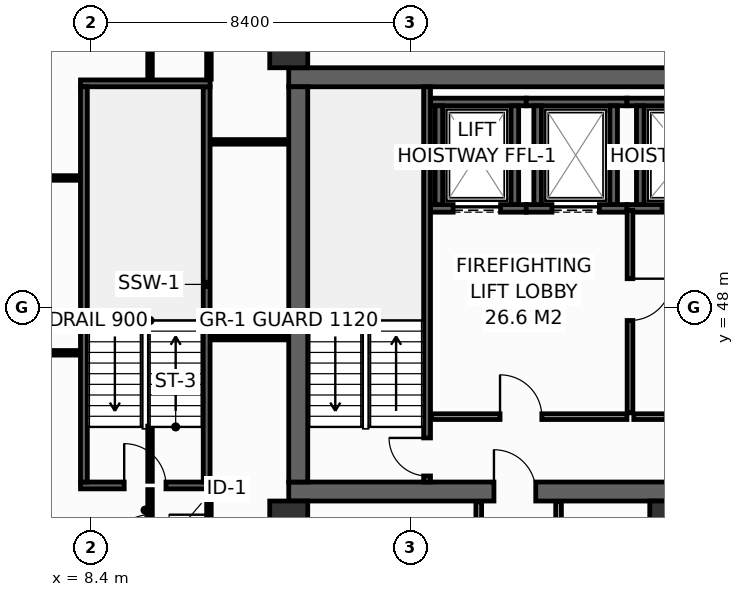
"""IFC4 building model, lengths in metres.
Left out: names, types, materials, properties, quantities, classifications, styles, units other than length and angle.
Written with IfcOpenShell. Run it as: python <this file> out.ifc"""

import sys

from ifc_helpers import new_model, si_unit, direction, frame, frame_2d, origin, origin_2d, place, context, subcontext, project, spatial, rectangle, hollow_rectangle, extrude, element, fill, save


model = new_model("IFC4")
c1 = context("Model", 3, precision=1e-05, world=origin(), true_north=direction((0.0, 1.0)))
c2 = subcontext(c1, "Body", "Model", "MODEL_VIEW")
j1 = project(units=[si_unit("LENGTHUNIT", "METRE"), si_unit("PLANEANGLEUNIT", "RADIAN")], contexts=[c1])
p1 = place(None, origin())
s1 = spatial("IfcSite", under=j1, at=p1, CompositionType="ELEMENT")
p2 = place(p1, origin())
s2 = spatial("IfcBuilding", under=s1, at=p2, CompositionType="ELEMENT")
p3 = place(p2, frame((0.0, 0.0, 133.4)))
s3 = spatial("IfcBuildingStorey", under=s2, at=p3, CompositionType="ELEMENT", Elevation=133.4)
p4 = place(p3, frame((13.6, 43.15, 0.0), z_axis=(0.0, 0.0, 1.0), x_axis=(1.0, 0.0, 0.0)))
e1 = element("IfcWall", 1, at=p4, inside=s3, PredefinedType="SHEAR", context=c2, shape_type="SweptSolid", body=[
    extrude(rectangle(XDim=32.7, YDim=0.5, at=frame_2d((16.35, 0.0))), origin(), (0.0, 0.0, 1.0), 3.55),
])
p5 = place(p4, frame((5.4, 0.0, 0.0)))
e2 = element("IfcOpeningElement", 2, at=p5, cuts=e1, PredefinedType="OPENING", context=c2, shape_type="SweptSolid", body=[
    extrude(rectangle(XDim=1.1, YDim=2.15, at=frame_2d((0.55, 1.075))), frame((0.0, 0.26, 0.0), z_axis=(0.0, -1.0, 0.0), x_axis=(1.0, 0.0, 0.0)), (0.0, 0.0, 1.0), 0.52),
])
p6 = place(p4, frame((25.6, 0.0, 0.0)))
e3 = element("IfcOpeningElement", 3, at=p6, cuts=e1, PredefinedType="OPENING", context=c2, shape_type="SweptSolid", body=[
    extrude(rectangle(XDim=1.1, YDim=2.15, at=frame_2d((0.55, 1.075))), frame((0.0, 0.26, 0.0), z_axis=(0.0, -1.0, 0.0), x_axis=(1.0, 0.0, 0.0)), (0.0, 0.0, 1.0), 0.52),
])
p7 = place(p3, frame((13.6, 54.05, 0.0), z_axis=(0.0, 0.0, 1.0), x_axis=(1.0, 0.0, 0.0)))
e4 = element("IfcWall", 4, at=p7, inside=s3, PredefinedType="SHEAR", context=c2, shape_type="SweptSolid", body=[
    extrude(rectangle(XDim=32.7, YDim=0.5, at=frame_2d((16.35, 0.0))), origin(), (0.0, 0.0, 1.0), 3.55),
])
p8 = place(p3, frame((13.85, 43.4, 0.0), z_axis=(0.0, 0.0, 1.0), x_axis=(0.0, 1.0, 0.0)))
e5 = element("IfcWall", 5, at=p8, inside=s3, PredefinedType="SHEAR", context=c2, shape_type="SweptSolid", body=[
    extrude(rectangle(XDim=10.4, YDim=0.5, at=frame_2d((5.2, 0.0))), origin(), (0.0, 0.0, 1.0), 3.55),
])
for number, where, z_axis, x_axis in (
    (6, (13.6, 54.8, 0.0), (0.0, 0.0, 1.0), (1.0, 0.0, 0.0)),
    (7, (13.6, 42.4, 0.0), (0.0, 0.0, 1.0), (1.0, 0.0, 0.0)),
    (8, (23.6, 42.4, 0.0), (0.0, 0.0, 1.0), (1.0, 0.0, 0.0)),
):
    element("IfcColumn", number, at=place(p3, frame(where, z_axis=z_axis, x_axis=x_axis)), inside=s3, PredefinedType="COLUMN", context=c2, shape_type="SweptSolid", body=[
        extrude(hollow_rectangle(XDim=1.0, YDim=1.0, WallThickness=0.045, at=origin_2d()), origin(), (0.0, 0.0, 1.0), 3.8),
    ])
p9 = place(p3, frame((17.33, 50.6, 0.0), z_axis=(0.0, 0.0, 1.0), x_axis=(1.0, 0.0, 0.0)))
e9 = element("IfcWall", 9, at=p9, inside=s3, PredefinedType="SHEAR", context=c2, shape_type="SweptSolid", body=[
    extrude(rectangle(XDim=2.52, YDim=0.2, at=frame_2d((1.26, 0.0))), origin(), (0.0, 0.0, 1.0), 3.55),
])
p10 = place(p9, frame((0.595, 0.0, 0.0)))
e10 = element("IfcOpeningElement", 10, at=p10, cuts=e9, PredefinedType="OPENING", context=c2, shape_type="SweptSolid", body=[
    extrude(rectangle(XDim=1.25, YDim=2.3, at=frame_2d((0.625, 1.15))), frame((0.0, 0.11, 0.0), z_axis=(0.0, -1.0, 0.0), x_axis=(1.0, 0.0, 0.0)), (0.0, 0.0, 1.0), 0.22),
])
p11 = place(p3, frame((17.33, 53.4, 0.0), z_axis=(0.0, 0.0, 1.0), x_axis=(1.0, 0.0, 0.0)))
e11 = element("IfcWall", 11, at=p11, inside=s3, PredefinedType="SHEAR", context=c2, shape_type="SweptSolid", body=[
    extrude(rectangle(XDim=2.52, YDim=0.2, at=frame_2d((1.26, 0.0))), origin(), (0.0, 0.0, 1.0), 3.55),
])
for number, where, z_axis, x_axis in (
    (12, (17.55, 50.7, 0.0), (0.0, 0.0, 1.0), (0.0, 1.0, 0.0)),
    (13, (19.55, 50.7, 0.0), (0.0, 0.0, 1.0), (0.0, 1.0, 0.0)),
):
    element("IfcWall", number, at=place(p3, frame(where, z_axis=z_axis, x_axis=x_axis)), inside=s3, PredefinedType="SHEAR", context=c2, shape_type="SweptSolid", body=[
        extrude(rectangle(XDim=2.6, YDim=0.2, at=frame_2d((1.3, 0.0))), origin(), (0.0, 0.0, 1.0), 3.55),
    ])
p12 = place(p3, frame((19.85, 50.6, 0.0), z_axis=(0.0, 0.0, 1.0), x_axis=(1.0, 0.0, 0.0)))
e14 = element("IfcWall", 14, at=p12, inside=s3, PredefinedType="SHEAR", context=c2, shape_type="SweptSolid", body=[
    extrude(rectangle(XDim=2.65, YDim=0.2, at=frame_2d((1.325, 0.0))), origin(), (0.0, 0.0, 1.0), 3.55),
])
p13 = place(p12, frame((0.675, 0.0, 0.0)))
e15 = element("IfcOpeningElement", 15, at=p13, cuts=e14, PredefinedType="OPENING", context=c2, shape_type="SweptSolid", body=[
    extrude(rectangle(XDim=1.25, YDim=2.3, at=frame_2d((0.625, 1.15))), frame((0.0, 0.11, 0.0), z_axis=(0.0, -1.0, 0.0), x_axis=(1.0, 0.0, 0.0)), (0.0, 0.0, 1.0), 0.22),
])
p14 = place(p3, frame((19.85, 53.4, 0.0), z_axis=(0.0, 0.0, 1.0), x_axis=(1.0, 0.0, 0.0)))
e16 = element("IfcWall", 16, at=p14, inside=s3, PredefinedType="SHEAR", context=c2, shape_type="SweptSolid", body=[
    extrude(rectangle(XDim=2.65, YDim=0.2, at=frame_2d((1.325, 0.0))), origin(), (0.0, 0.0, 1.0), 3.55),
])
for number, where, z_axis, x_axis in (
    (17, (20.15, 50.7, 0.0), (0.0, 0.0, 1.0), (0.0, 1.0, 0.0)),
    (18, (22.15, 50.7, 0.0), (0.0, 0.0, 1.0), (0.0, 1.0, 0.0)),
):
    element("IfcWall", number, at=place(p3, frame(where, z_axis=z_axis, x_axis=x_axis)), inside=s3, PredefinedType="SHEAR", context=c2, shape_type="SweptSolid", body=[
        extrude(rectangle(XDim=2.6, YDim=0.2, at=frame_2d((1.3, 0.0))), origin(), (0.0, 0.0, 1.0), 3.55),
    ])
p15 = place(p3, frame((22.5, 50.6, 0.0), z_axis=(0.0, 0.0, 1.0), x_axis=(1.0, 0.0, 0.0)))
e19 = element("IfcWall", 19, at=p15, inside=s3, PredefinedType="SHEAR", context=c2, shape_type="SweptSolid", body=[
    extrude(rectangle(XDim=2.85, YDim=0.2, at=frame_2d((1.425, 0.0))), origin(), (0.0, 0.0, 1.0), 3.55),
])
p16 = place(p15, frame((0.925, 0.0, 0.0)))
e20 = element("IfcOpeningElement", 20, at=p16, cuts=e19, PredefinedType="OPENING", context=c2, shape_type="SweptSolid", body=[
    extrude(rectangle(XDim=1.25, YDim=2.3, at=frame_2d((0.625, 1.15))), frame((0.0, 0.11, 0.0), z_axis=(0.0, -1.0, 0.0), x_axis=(1.0, 0.0, 0.0)), (0.0, 0.0, 1.0), 0.22),
])
p17 = place(p3, frame((22.5, 53.4, 0.0), z_axis=(0.0, 0.0, 1.0), x_axis=(1.0, 0.0, 0.0)))
e21 = element("IfcWall", 21, at=p17, inside=s3, PredefinedType="SHEAR", context=c2, shape_type="SweptSolid", body=[
    extrude(rectangle(XDim=2.85, YDim=0.2, at=frame_2d((1.425, 0.0))), origin(), (0.0, 0.0, 1.0), 3.55),
])
p18 = place(p3, frame((22.85, 50.7, 0.0), z_axis=(0.0, 0.0, 1.0), x_axis=(0.0, 1.0, 0.0)))
e22 = element("IfcWall", 22, at=p18, inside=s3, PredefinedType="SHEAR", context=c2, shape_type="SweptSolid", body=[
    extrude(rectangle(XDim=2.6, YDim=0.2, at=frame_2d((1.3, 0.0))), origin(), (0.0, 0.0, 1.0), 3.55),
])
p19 = place(p3, frame((17.24, 43.4, 0.0), z_axis=(0.0, 0.0, 1.0), x_axis=(0.0, 1.0, 0.0)))
e23 = element("IfcWall", 23, at=p19, inside=s3, PredefinedType="SHEAR", context=c2, shape_type="SweptSolid", body=[
    extrude(rectangle(XDim=10.4, YDim=0.18, at=frame_2d((5.2, 0.0))), origin(), (0.0, 0.0, 1.0), 3.55),
])
p20 = place(p19, frame((0.16, 0.0, 0.0)))
e24 = element("IfcOpeningElement", 24, at=p20, cuts=e23, PredefinedType="OPENING", context=c2, shape_type="SweptSolid", body=[
    extrude(rectangle(XDim=1.0, YDim=2.15, at=frame_2d((0.5, 1.075))), frame((0.0, 0.1, 0.0), z_axis=(0.0, -1.0, 0.0), x_axis=(1.0, 0.0, 0.0)), (0.0, 0.0, 1.0), 0.2),
])
p21 = place(p3, frame((8.12, 43.31, 0.0), z_axis=(0.0, 0.0, 1.0), x_axis=(1.0, 0.0, 0.0)))
e25 = element("IfcWall", 25, at=p21, inside=s3, PredefinedType="SHEAR", context=c2, shape_type="SweptSolid", body=[
    extrude(rectangle(XDim=3.41, YDim=0.18, at=frame_2d((1.705, 0.0))), origin(), (0.0, 0.0, 1.0), 3.55),
])
p22 = place(p21, frame((1.15, 0.0, 0.0)))
e26 = element("IfcOpeningElement", 26, at=p22, cuts=e25, PredefinedType="OPENING", context=c2, shape_type="SweptSolid", body=[
    extrude(rectangle(XDim=1.1, YDim=2.15, at=frame_2d((0.55, 1.075))), frame((0.0, 0.1, 0.0), z_axis=(0.0, -1.0, 0.0), x_axis=(1.0, 0.0, 0.0)), (0.0, 0.0, 1.0), 0.2),
])
p23 = place(p3, frame((11.44, 43.4, 0.0), z_axis=(0.0, 0.0, 1.0), x_axis=(0.0, 1.0, 0.0)))
e27 = element("IfcWall", 27, at=p23, inside=s3, PredefinedType="SHEAR", context=c2, shape_type="SweptSolid", body=[
    extrude(rectangle(XDim=10.4, YDim=0.18, at=frame_2d((5.2, 0.0))), origin(), (0.0, 0.0, 1.0), 3.55),
])
p24 = place(p3, frame((11.53, 53.89, 0.0), z_axis=(0.0, 0.0, 1.0), x_axis=(-1.0, 0.0, 0.0)))
e28 = element("IfcWall", 28, at=p24, inside=s3, PredefinedType="SHEAR", context=c2, shape_type="SweptSolid", body=[
    extrude(rectangle(XDim=3.41, YDim=0.18, at=frame_2d((1.705, 0.0))), origin(), (0.0, 0.0, 1.0), 3.55),
])
p25 = place(p3, frame((8.21, 53.8, 0.0), z_axis=(0.0, 0.0, 1.0), x_axis=(0.0, -1.0, 0.0)))
e29 = element("IfcWall", 29, at=p25, inside=s3, PredefinedType="SHEAR", context=c2, shape_type="SweptSolid", body=[
    extrude(rectangle(XDim=10.4, YDim=0.18, at=frame_2d((5.2, 0.0))), origin(), (0.0, 0.0, 1.0), 3.55),
])
p26 = place(p3, frame((17.36, 45.12, 0.0), z_axis=(0.0, 0.0, 1.0), x_axis=(1.0, 0.0, 0.0)))
e30 = element("IfcWall", 30, at=p26, inside=s3, PredefinedType="PARTITIONING", context=c2, shape_type="SweptSolid", body=[
    extrude(rectangle(XDim=5.14, YDim=0.15, at=frame_2d((2.57, 0.0))), origin(), (0.0, 0.0, 1.0), 3.55),
])
p27 = place(p26, frame((1.8, 0.0, 0.0)))
e31 = element("IfcOpeningElement", 31, at=p27, cuts=e30, PredefinedType="OPENING", context=c2, shape_type="SweptSolid", body=[
    extrude(rectangle(XDim=1.1, YDim=2.15, at=frame_2d((0.55, 1.075))), frame((0.0, 0.085, 0.0), z_axis=(0.0, -1.0, 0.0), x_axis=(1.0, 0.0, 0.0)), (0.0, 0.0, 1.0), 0.17),
])
p28 = place(p3, frame((22.58, 50.55, 0.0), z_axis=(0.0, 0.0, 1.0), x_axis=(0.0, -1.0, 0.0)))
e32 = element("IfcWall", 32, at=p28, inside=s3, PredefinedType="PARTITIONING", context=c2, shape_type="SweptSolid", body=[
    extrude(rectangle(XDim=5.33, YDim=0.15, at=frame_2d((2.665, 0.0))), origin(), (0.0, 0.0, 1.0), 3.55),
])
p29 = place(p28, frame((1.8, 0.0, 0.0)))
e33 = element("IfcOpeningElement", 33, at=p29, cuts=e32, PredefinedType="OPENING", context=c2, shape_type="SweptSolid", body=[
    extrude(rectangle(XDim=1.1, YDim=2.15, at=frame_2d((0.55, 1.075))), frame((0.0, 0.085, 0.0), z_axis=(0.0, -1.0, 0.0), x_axis=(1.0, 0.0, 0.0)), (0.0, 0.0, 1.0), 0.17),
])
p30 = place(p3, frame((22.68, 45.12, 0.0), z_axis=(0.0, 0.0, 1.0), x_axis=(1.0, 0.0, 0.0)))
e34 = element("IfcWall", 34, at=p30, inside=s3, PredefinedType="PARTITIONING", context=c2, shape_type="SweptSolid", body=[
    extrude(rectangle(XDim=2.92, YDim=0.15, at=frame_2d((1.46, 0.0))), origin(), (0.0, 0.0, 1.0), 3.55),
])
p31 = place(p30, frame((0.85, 0.0, 0.0)))
e35 = element("IfcOpeningElement", 35, at=p31, cuts=e34, PredefinedType="OPENING", context=c2, shape_type="SweptSolid", body=[
    extrude(rectangle(XDim=1.1, YDim=2.15, at=frame_2d((0.55, 1.075))), frame((0.0, 0.085, 0.0), z_axis=(0.0, -1.0, 0.0), x_axis=(1.0, 0.0, 0.0)), (0.0, 0.0, 1.0), 0.17),
])
p32 = place(p3, frame((11.55, 52.35, 0.0), z_axis=(0.0, 0.0, 1.0), x_axis=(1.0, 0.0, 0.0)))
e36 = element("IfcWall", 36, at=p32, inside=s3, PredefinedType="PARTITIONING", context=c2, shape_type="SweptSolid", body=[
    extrude(rectangle(XDim=2.03, YDim=0.12, at=frame_2d((1.015, 0.0))), origin(), (0.0, 0.0, 1.0), 3.55),
])
p33 = place(p3, frame((11.5, 54.0, 0.0), z_axis=(0.0, 0.0, 1.0), x_axis=(0.0, 1.0, 0.0)))
e37 = element("IfcWall", 37, at=p33, inside=s3, PredefinedType="PARTITIONING", context=c2, shape_type="SweptSolid", body=[
    extrude(rectangle(XDim=1.995, YDim=0.12, at=frame_2d((0.998, 0.0))), origin(), (0.0, 0.0, 1.0), 2.935),
])
p34 = place(p3, frame((5.003, 46.8, 0.0), z_axis=(0.0, 0.0, 1.0), x_axis=(1.0, 0.0, 0.0)))
e38 = element("IfcWall", 38, at=p34, inside=s3, PredefinedType="PARTITIONING", context=c2, shape_type="SweptSolid", body=[
    extrude(rectangle(XDim=3.097, YDim=0.12, at=frame_2d((1.549, 0.0))), origin(), (0.0, 0.0, 1.0), 2.835),
])
p35 = place(p3, frame((4.238, 51.4, 0.0), z_axis=(0.0, 0.0, 1.0), x_axis=(1.0, 0.0, 0.0)))
e39 = element("IfcWall", 39, at=p35, inside=s3, PredefinedType="PARTITIONING", context=c2, shape_type="SweptSolid", body=[
    extrude(rectangle(XDim=3.862, YDim=0.12, at=frame_2d((1.931, 0.0))), origin(), (0.0, 0.0, 1.0), 2.835),
])
p36 = place(p3, frame((9.95, 40.83, 0.0), z_axis=(0.0, 0.0, 1.0), x_axis=(0.0, 1.0, 0.0)))
e40 = element("IfcWall", 40, at=p36, inside=s3, PredefinedType="PARTITIONING", context=c2, shape_type="SweptSolid", body=[
    extrude(rectangle(XDim=2.37, YDim=0.12, at=frame_2d((1.185, 0.0))), origin(), (0.0, 0.0, 1.0), 2.835),
])
p37 = place(p36, frame((0.66, 0.0, 0.0)))
e41 = element("IfcOpeningElement", 41, at=p37, cuts=e40, PredefinedType="OPENING", context=c2, shape_type="SweptSolid", body=[
    extrude(rectangle(XDim=1.05, YDim=2.15, at=frame_2d((0.525, 1.075))), frame((0.0, 0.07, 0.0), z_axis=(0.0, -1.0, 0.0), x_axis=(1.0, 0.0, 0.0)), (0.0, 0.0, 1.0), 0.14),
])
p38 = place(p3, frame((9.95, 43.42, 0.0), z_axis=(0.0, 0.0, 1.0), x_axis=(0.0, 1.0, 0.0)))
e42 = element("IfcWall", 42, at=p38, inside=s3, PredefinedType="PARTITIONING", context=c2, shape_type="SweptSolid", body=[
    extrude(rectangle(XDim=1.45, YDim=0.12, at=frame_2d((0.725, 0.0))), origin(), (0.0, 0.0, 1.0), 3.55),
])
p39 = place(p3, frame((9.95, 54.0, 0.0), z_axis=(0.0, 0.0, 1.0), x_axis=(0.0, 1.0, 0.0)))
e43 = element("IfcWall", 43, at=p39, inside=s3, PredefinedType="PARTITIONING", context=c2, shape_type="SweptSolid", body=[
    extrude(rectangle(XDim=1.995, YDim=0.12, at=frame_2d((0.998, 0.0))), origin(), (0.0, 0.0, 1.0), 2.935),
])
p40 = place(p3, frame((11.55, 47.2, 0.0), z_axis=(0.0, 0.0, 1.0), x_axis=(1.0, 0.0, 0.0)))
e44 = element("IfcWall", 44, at=p40, inside=s3, PredefinedType="PARTITIONING", context=c2, shape_type="SweptSolid", body=[
    extrude(rectangle(XDim=2.03, YDim=0.12, at=frame_2d((1.015, 0.0))), origin(), (0.0, 0.0, 1.0), 3.55),
])
p41 = place(p3, frame((11.5, 40.83, 0.0), z_axis=(0.0, 0.0, 1.0), x_axis=(0.0, 1.0, 0.0)))
e45 = element("IfcWall", 45, at=p41, inside=s3, PredefinedType="PARTITIONING", context=c2, shape_type="SweptSolid", body=[
    extrude(rectangle(XDim=2.37, YDim=0.12, at=frame_2d((1.185, 0.0))), origin(), (0.0, 0.0, 1.0), 2.835),
])
p42 = place(p41, frame((0.66, 0.0, 0.0)))
e46 = element("IfcOpeningElement", 46, at=p42, cuts=e45, PredefinedType="OPENING", context=c2, shape_type="SweptSolid", body=[
    extrude(rectangle(XDim=1.05, YDim=2.15, at=frame_2d((0.525, 1.075))), frame((0.0, 0.07, 0.0), z_axis=(0.0, -1.0, 0.0), x_axis=(1.0, 0.0, 0.0)), (0.0, 0.0, 1.0), 0.14),
])
p43 = place(p3, frame((13.8, 40.83, 0.0), z_axis=(0.0, 0.0, 1.0), x_axis=(0.0, 1.0, 0.0)))
e47 = element("IfcWall", 47, at=p43, inside=s3, PredefinedType="PARTITIONING", context=c2, shape_type="SweptSolid", body=[
    extrude(rectangle(XDim=2.05, YDim=0.15, at=frame_2d((1.025, 0.0))), origin(), (0.0, 0.0, 1.0), 3.55),
])
for number, where, z_axis, x_axis in (
    (48, (18.6, 40.75, 0.0), (0.0, 0.0, 1.0), (0.0, 1.0, 0.0)),
    (49, (20.7, 40.75, 0.0), (0.0, 0.0, 1.0), (0.0, 1.0, 0.0)),
):
    element("IfcWall", number, at=place(p3, frame(where, z_axis=z_axis, x_axis=x_axis)), inside=s3, PredefinedType="PARTITIONING", context=c2, shape_type="SweptSolid", body=[
        extrude(rectangle(XDim=2.13, YDim=0.15, at=frame_2d((1.065, 0.0))), origin(), (0.0, 0.0, 1.0), 3.55),
    ])
p44 = place(p10, origin())
e50 = element("IfcDoor", 50, at=p44, inside=s3, OperationType="SLIDING_TO_LEFT", PredefinedType="DOOR", context=c2, shape_type="SweptSolid", body=[
    extrude(rectangle(XDim=1.25, YDim=2.3, at=frame_2d((0.625, 1.15))), frame((0.0, 0.025, 0.0), z_axis=(0.0, -1.0, 0.0), x_axis=(1.0, 0.0, 0.0)), (0.0, 0.0, 1.0), 0.05),
])
fill(e10, e50)
p45 = place(p13, origin())
e51 = element("IfcDoor", 51, at=p45, inside=s3, OperationType="SLIDING_TO_LEFT", PredefinedType="DOOR", context=c2, shape_type="SweptSolid", body=[
    extrude(rectangle(XDim=1.25, YDim=2.3, at=frame_2d((0.625, 1.15))), frame((0.0, 0.025, 0.0), z_axis=(0.0, -1.0, 0.0), x_axis=(1.0, 0.0, 0.0)), (0.0, 0.0, 1.0), 0.05),
])
fill(e15, e51)
p46 = place(p16, origin())
e52 = element("IfcDoor", 52, at=p46, inside=s3, OperationType="SLIDING_TO_LEFT", PredefinedType="DOOR", context=c2, shape_type="SweptSolid", body=[
    extrude(rectangle(XDim=1.25, YDim=2.3, at=frame_2d((0.625, 1.15))), frame((0.0, 0.025, 0.0), z_axis=(0.0, -1.0, 0.0), x_axis=(1.0, 0.0, 0.0)), (0.0, 0.0, 1.0), 0.05),
])
fill(e20, e52)
p47 = place(p20, origin())
e53 = element("IfcDoor", 53, at=p47, inside=s3, OperationType="SINGLE_SWING_RIGHT", PredefinedType="DOOR", context=c2, shape_type="SweptSolid", body=[
    extrude(rectangle(XDim=1.0, YDim=2.15, at=frame_2d((0.5, 1.075))), frame((0.0, 0.025, 0.0), z_axis=(0.0, -1.0, 0.0), x_axis=(1.0, 0.0, 0.0)), (0.0, 0.0, 1.0), 0.05),
])
fill(e24, e53)
p48 = place(p22, origin())
e54 = element("IfcDoor", 54, at=p48, inside=s3, OperationType="SINGLE_SWING_LEFT", PredefinedType="DOOR", context=c2, shape_type="SweptSolid", body=[
    extrude(rectangle(XDim=1.1, YDim=2.15, at=frame_2d((0.55, 1.075))), frame((0.0, 0.025, 0.0), z_axis=(0.0, -1.0, 0.0), x_axis=(1.0, 0.0, 0.0)), (0.0, 0.0, 1.0), 0.05),
])
fill(e26, e54)
p49 = place(p27, origin())
e55 = element("IfcDoor", 55, at=p49, inside=s3, OperationType="SINGLE_SWING_LEFT", PredefinedType="DOOR", context=c2, shape_type="SweptSolid", body=[
    extrude(rectangle(XDim=1.1, YDim=2.15, at=frame_2d((0.55, 1.075))), frame((0.0, 0.025, 0.0), z_axis=(0.0, -1.0, 0.0), x_axis=(1.0, 0.0, 0.0)), (0.0, 0.0, 1.0), 0.05),
])
fill(e31, e55)
p50 = place(p29, origin())
e56 = element("IfcDoor", 56, at=p50, inside=s3, OperationType="SINGLE_SWING_LEFT", PredefinedType="DOOR", context=c2, shape_type="SweptSolid", body=[
    extrude(rectangle(XDim=1.1, YDim=2.15, at=frame_2d((0.55, 1.075))), frame((0.0, 0.025, 0.0), z_axis=(0.0, -1.0, 0.0), x_axis=(1.0, 0.0, 0.0)), (0.0, 0.0, 1.0), 0.05),
])
fill(e33, e56)
p51 = place(p5, origin())
e57 = element("IfcDoor", 57, at=p51, inside=s3, OperationType="SINGLE_SWING_LEFT", PredefinedType="DOOR", context=c2, shape_type="SweptSolid", body=[
    extrude(rectangle(XDim=1.1, YDim=2.15, at=frame_2d((0.55, 1.075))), frame((0.0, 0.025, 0.0), z_axis=(0.0, -1.0, 0.0), x_axis=(1.0, 0.0, 0.0)), (0.0, 0.0, 1.0), 0.05),
])
fill(e2, e57)
p52 = place(p37, origin())
e58 = element("IfcDoor", 58, at=p52, inside=s3, OperationType="SINGLE_SWING_LEFT", PredefinedType="DOOR", context=c2, shape_type="SweptSolid", body=[
    extrude(rectangle(XDim=1.05, YDim=2.15, at=frame_2d((0.525, 1.075))), frame((0.0, 0.025, 0.0), z_axis=(0.0, -1.0, 0.0), x_axis=(1.0, 0.0, 0.0)), (0.0, 0.0, 1.0), 0.05),
])
fill(e41, e58)
p53 = place(p42, origin())
e59 = element("IfcDoor", 59, at=p53, inside=s3, OperationType="SINGLE_SWING_RIGHT", PredefinedType="DOOR", context=c2, shape_type="SweptSolid", body=[
    extrude(rectangle(XDim=1.05, YDim=2.15, at=frame_2d((0.525, 1.075))), frame((0.0, 0.025, 0.0), z_axis=(0.0, -1.0, 0.0), x_axis=(1.0, 0.0, 0.0)), (0.0, 0.0, 1.0), 0.05),
])
fill(e46, e59)
save(model, sys.argv[1])
